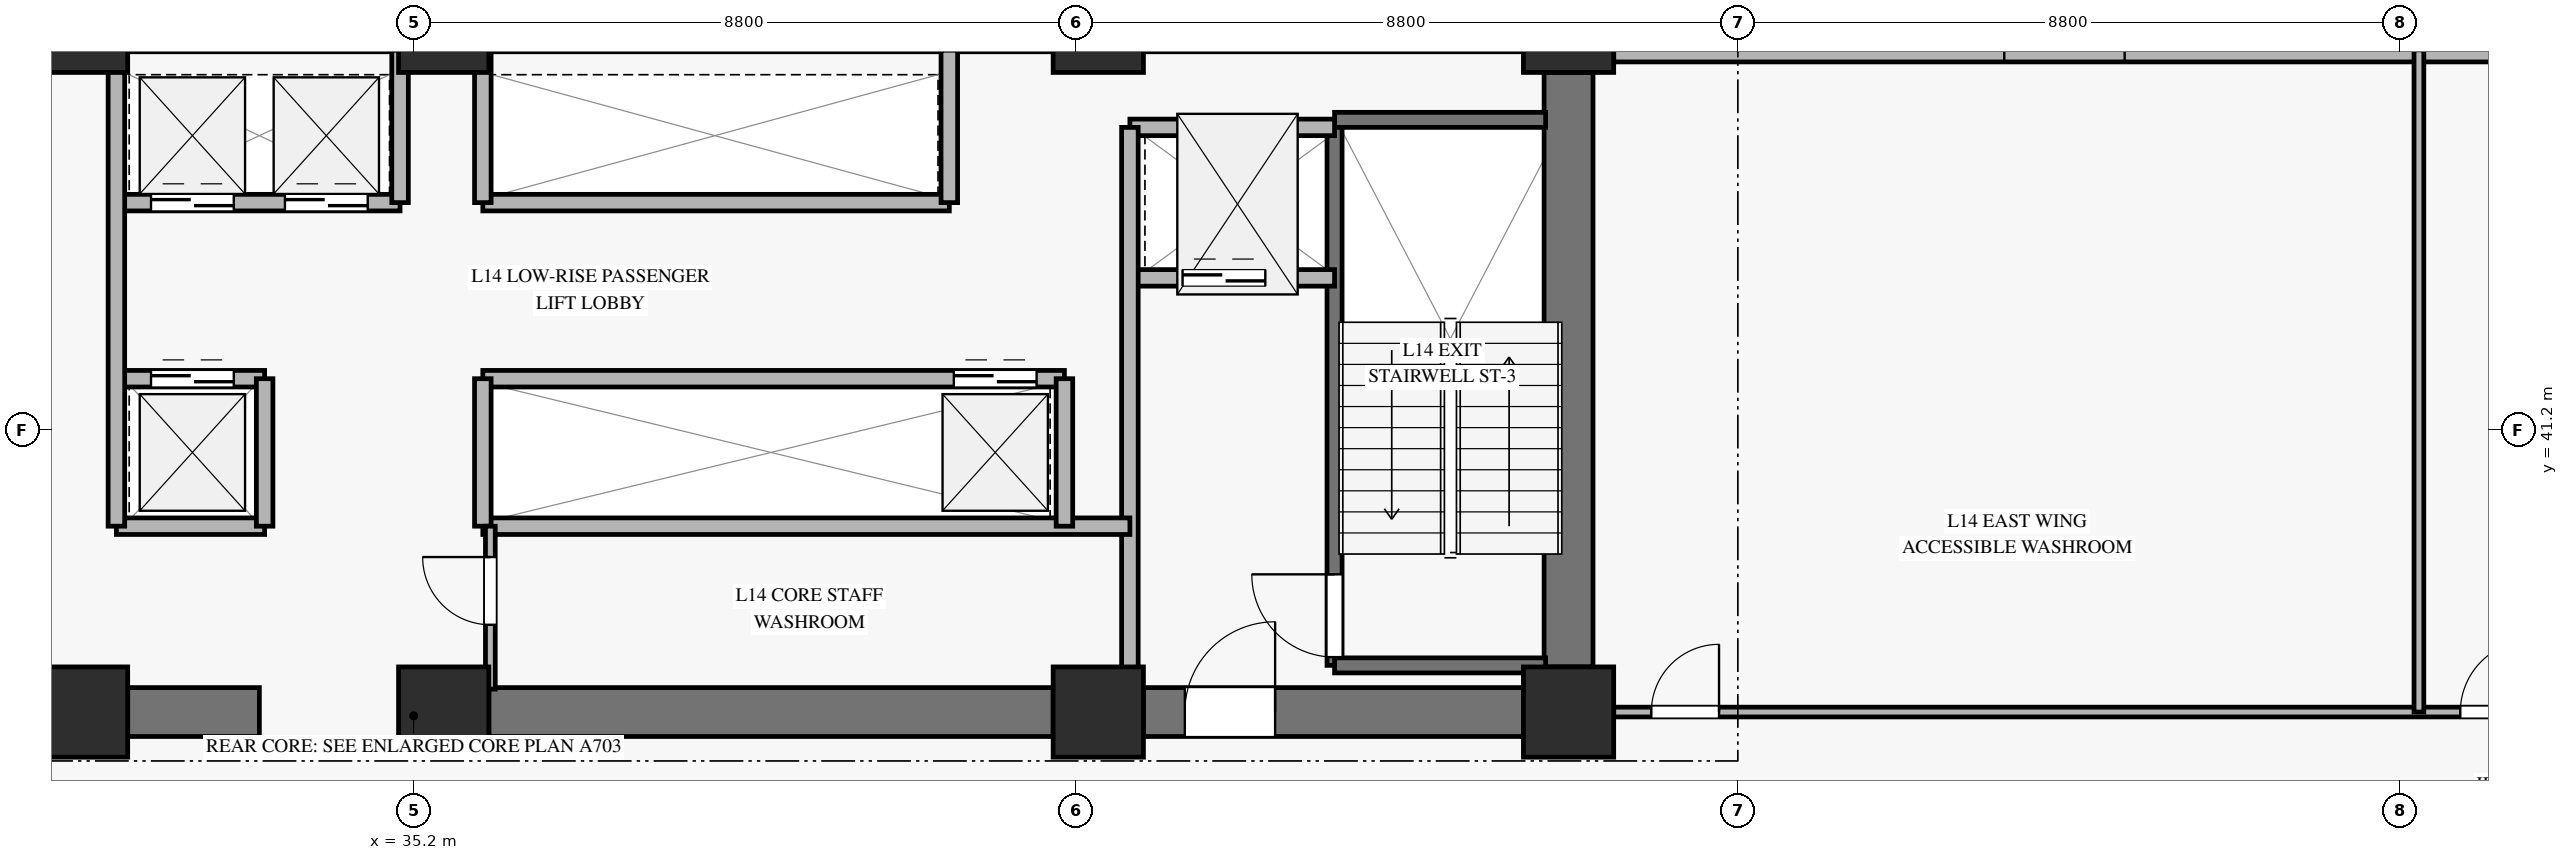
"""IFC4 building model, lengths in metres.
Left out: names, types, materials, properties, quantities, classifications, styles, units other than length and angle.
Written with IfcOpenShell. Run it as: python <this file> out.ifc"""

import sys

from ifc_helpers import new_model, si_unit, direction, frame, frame_2d, origin, origin_2d, place, context, subcontext, project, spatial, rectangle, hollow_rectangle, extrude, source, transform, mapped, element, fill, save


model = new_model("IFC4")
c1 = context("Model", 3, precision=1e-05, world=origin(), true_north=direction((0.0, 1.0)))
c2 = subcontext(c1, "Body", "Model", "MODEL_VIEW")
j1 = project(units=[si_unit("LENGTHUNIT", "METRE"), si_unit("PLANEANGLEUNIT", "RADIAN")], contexts=[c1])
p1 = place(None, origin())
s1 = spatial("IfcSite", under=j1, at=p1, CompositionType="ELEMENT")
p2 = place(p1, origin())
s2 = spatial("IfcBuilding", under=s1, at=p2, CompositionType="ELEMENT")
p3 = place(p2, frame((0.0, 0.0, 57.2)))
s3 = spatial("IfcBuildingStorey", under=s2, at=p3, CompositionType="ELEMENT", Elevation=57.2)
m1 = source(origin(), c2, "Body", "SweptSolid", [
    extrude(rectangle(XDim=1.2, YDim=1.2, at=origin_2d()), origin(), (0.0, 0.0, 1.0), 3.68),
])
for number, where, z_axis, x_axis in (
    (1, (30.8, 37.45, 0.0), (0.0, 0.0, 1.0), (1.0, 0.0, 0.0)),
    (2, (30.8, 46.55, 0.0), (0.0, 0.0, 1.0), (1.0, 0.0, 0.0)),
    (3, (35.6, 37.45, 0.0), (0.0, 0.0, 1.0), (1.0, 0.0, 0.0)),
    (4, (35.6, 46.55, 0.0), (0.0, 0.0, 1.0), (1.0, 0.0, 0.0)),
    (5, (44.3, 37.45, 0.0), (0.0, 0.0, 1.0), (1.0, 0.0, 0.0)),
    (6, (44.3, 46.55, 0.0), (0.0, 0.0, 1.0), (1.0, 0.0, 0.0)),
    (7, (50.55, 37.45, 0.0), (0.0, 0.0, 1.0), (1.0, 0.0, 0.0)),
    (8, (50.55, 46.55, 0.0), (0.0, 0.0, 1.0), (1.0, 0.0, 0.0)),
):
    element("IfcColumn", number, at=place(p3, frame(where, z_axis=z_axis, x_axis=x_axis)), inside=s3, PredefinedType="PILASTER", context=c2, shape_type="MappedRepresentation", body=[
        mapped(m1, transform((0.0, 0.0, 0.0), x_axis=(1.0, 0.0, 0.0), y_axis=(0.0, 1.0, 0.0), z_axis=(0.0, 0.0, 1.0), scale=1.0)),
    ])
p4 = place(p3, frame((31.4, 37.45, 0.0), z_axis=(0.0, 0.0, 1.0), x_axis=(1.0, 0.0, 0.0)))
e9 = element("IfcWall", 9, at=p4, inside=s3, PredefinedType="SHEAR", context=c2, shape_type="SweptSolid", body=[
    extrude(rectangle(XDim=1.75, YDim=0.65, at=frame_2d((0.875, 0.0))), origin(), (0.0, 0.0, 1.0), 3.68),
])
p5 = place(p3, frame((36.2, 37.45, 0.0), z_axis=(0.0, 0.0, 1.0), x_axis=(1.0, 0.0, 0.0)))
e10 = element("IfcWall", 10, at=p5, inside=s3, PredefinedType="SHEAR", context=c2, shape_type="SweptSolid", body=[
    extrude(rectangle(XDim=7.5, YDim=0.65, at=frame_2d((3.75, 0.0))), origin(), (0.0, 0.0, 1.0), 3.68),
])
p6 = place(p3, frame((44.9, 37.45, 0.0), z_axis=(0.0, 0.0, 1.0), x_axis=(1.0, 0.0, 0.0)))
e11 = element("IfcWall", 11, at=p6, inside=s3, PredefinedType="SHEAR", context=c2, shape_type="SweptSolid", body=[
    extrude(rectangle(XDim=5.05, YDim=0.65, at=frame_2d((2.525, 0.0))), origin(), (0.0, 0.0, 1.0), 3.68),
])
p7 = place(p6, frame((0.55, 0.0, 0.0)))
e12 = element("IfcOpeningElement", 12, at=p7, cuts=e11, PredefinedType="OPENING", context=c2, shape_type="SweptSolid", body=[
    extrude(rectangle(XDim=1.2, YDim=2.15, at=frame_2d((0.6, 1.075))), frame((0.0, 0.335, 0.0), z_axis=(0.0, -1.0, 0.0), x_axis=(1.0, 0.0, 0.0)), (0.0, 0.0, 1.0), 0.67),
])
p8 = place(p3, frame((50.55, 38.05, 0.0), z_axis=(0.0, 0.0, 1.0), x_axis=(0.0, 1.0, 0.0)))
e13 = element("IfcWall", 13, at=p8, inside=s3, PredefinedType="SHEAR", context=c2, shape_type="SweptSolid", body=[
    extrude(rectangle(XDim=7.9, YDim=0.65, at=frame_2d((3.95, 0.0))), origin(), (0.0, 0.0, 1.0), 3.68),
])
m2 = source(origin(), c2, "Body", "SweptSolid", [
    extrude(hollow_rectangle(XDim=1.6, YDim=1.6, WallThickness=0.075, at=origin_2d()), origin(), (0.0, 0.0, 1.0), 3.686),
])
p9 = place(p3, frame((63.682, 42.952, 0.0), z_axis=(-0.05636738431, 0.007087320941, 0.998384939724), x_axis=(-0.124752184173, -0.992187932069, 0.0)))
e14 = element("IfcColumn", 14, at=p9, inside=s3, PredefinedType="COLUMN", context=c2, shape_type="MappedRepresentation", body=[
    mapped(m2, transform((0.0, 0.0, 0.0), x_axis=(1.0, 0.0, 0.0), y_axis=(0.0, 1.0, 0.0), z_axis=(0.0, 0.0, 1.0), scale=1.0)),
])
p10 = place(p3, frame((51.15, 46.25, 0.0), z_axis=(0.0, 0.0, 1.0), x_axis=(1.0, 0.0, 0.0)))
e15 = element("IfcWall", 15, at=p10, inside=s3, PredefinedType="SOLIDWALL", context=c2, shape_type="SweptSolid", body=[
    extrude(rectangle(XDim=11.982, YDim=0.32, at=frame_2d((5.991, 0.0))), origin(), (0.0, 0.0, 1.0), 3.16),
])
p11 = place(p10, frame((5.191, 0.0, 0.45)))
e16 = element("IfcOpeningElement", 16, at=p11, cuts=e15, PredefinedType="OPENING", context=c2, shape_type="SweptSolid", body=[
    extrude(rectangle(XDim=1.6, YDim=2.0, at=frame_2d((0.8, 1.0))), frame((0.0, 0.17, 0.0), z_axis=(0.0, -1.0, 0.0), x_axis=(1.0, 0.0, 0.0)), (0.0, 0.0, 1.0), 0.34),
])
p12 = place(p3, frame((47.44, 38.07, 0.0), z_axis=(0.0, 0.0, 1.0), x_axis=(0.0, 1.0, 0.0)))
e17 = element("IfcWall", 17, at=p12, inside=s3, PredefinedType="SOLIDWALL", context=c2, shape_type="SweptSolid", body=[
    extrude(rectangle(XDim=7.25, YDim=0.2, at=frame_2d((3.625, 0.0))), origin(), (0.0, 0.0, 1.0), 3.9),
])
p13 = place(p12, frame((0.11, 0.0, 0.0)))
e18 = element("IfcOpeningElement", 18, at=p13, cuts=e17, PredefinedType="OPENING", context=c2, shape_type="SweptSolid", body=[
    extrude(rectangle(XDim=1.1, YDim=2.15, at=frame_2d((0.55, 1.075))), frame((0.0, 0.11, 0.0), z_axis=(0.0, -1.0, 0.0), x_axis=(1.0, 0.0, 0.0)), (0.0, 0.0, 1.0), 0.22),
])
for number, where, z_axis, x_axis in (
    (19, (47.44, 45.32, 0.0), (0.0, 0.0, 1.0), (1.0, 0.0, 0.0)),
    (20, (47.44, 38.07, 0.0), (0.0, 0.0, 1.0), (1.0, 0.0, 0.0)),
):
    element("IfcWall", number, at=place(p3, frame(where, z_axis=z_axis, x_axis=x_axis)), inside=s3, PredefinedType="SOLIDWALL", context=c2, shape_type="SweptSolid", body=[
        extrude(rectangle(XDim=2.805, YDim=0.2, at=frame_2d((1.403, 0.0))), origin(), (0.0, 0.0, 1.0), 3.9),
    ])
p14 = place(p3, frame((44.72, 43.22, 0.0), z_axis=(0.0, 0.0, 1.0), x_axis=(1.0, 0.0, 0.0)))
e21 = element("IfcWall", 21, at=p14, inside=s3, PredefinedType="SOLIDWALL", context=c2, shape_type="SweptSolid", body=[
    extrude(rectangle(XDim=2.72, YDim=0.22, at=frame_2d((1.36, 0.0))), origin(), (0.0, 0.0, 1.0), 3.68),
])
p15 = place(p14, frame((0.7, 0.0, 0.0)))
e22 = element("IfcOpeningElement", 22, at=p15, cuts=e21, PredefinedType="OPENING", context=c2, shape_type="SweptSolid", body=[
    extrude(rectangle(XDim=1.1, YDim=2.2, at=frame_2d((0.55, 1.1))), frame((0.0, 0.12, 0.0), z_axis=(0.0, -1.0, 0.0), x_axis=(1.0, 0.0, 0.0)), (0.0, 0.0, 1.0), 0.24),
])
p16 = place(p3, frame((44.72, 45.22, 0.0), z_axis=(0.0, 0.0, 1.0), x_axis=(1.0, 0.0, 0.0)))
e23 = element("IfcWall", 23, at=p16, inside=s3, PredefinedType="SOLIDWALL", context=c2, shape_type="SweptSolid", body=[
    extrude(rectangle(XDim=2.72, YDim=0.22, at=frame_2d((1.36, 0.0))), origin(), (0.0, 0.0, 1.0), 3.68),
])
p17 = place(p3, frame((44.72, 37.755, 0.0), z_axis=(0.0, 0.0, 1.0), x_axis=(0.0, 1.0, 0.0)))
e24 = element("IfcWall", 24, at=p17, inside=s3, PredefinedType="SOLIDWALL", context=c2, shape_type="SweptSolid", body=[
    extrude(rectangle(XDim=7.465, YDim=0.22, at=frame_2d((3.732, 0.0))), origin(), (0.0, 0.0, 1.0), 3.68),
])
p18 = place(p3, frame((31.25, 44.22, 0.0), z_axis=(0.0, 0.0, 1.0), x_axis=(1.0, 0.0, 0.0)))
e25 = element("IfcWall", 25, at=p18, inside=s3, PredefinedType="SOLIDWALL", context=c2, shape_type="SweptSolid", body=[
    extrude(rectangle(XDim=3.77, YDim=0.22, at=frame_2d((1.885, 0.0))), origin(), (0.0, 0.0, 1.0), 3.68),
])
p19 = place(p18, frame((0.46, 0.0, 0.0)))
e26 = element("IfcOpeningElement", 26, at=p19, cuts=e25, PredefinedType="OPENING", context=c2, shape_type="SweptSolid", body=[
    extrude(rectangle(XDim=1.1, YDim=2.2, at=frame_2d((0.55, 1.1))), frame((0.0, 0.12, 0.0), z_axis=(0.0, -1.0, 0.0), x_axis=(1.0, 0.0, 0.0)), (0.0, 0.0, 1.0), 0.24),
])
p20 = place(p18, frame((2.24, 0.0, 0.0)))
e27 = element("IfcOpeningElement", 27, at=p20, cuts=e25, PredefinedType="OPENING", context=c2, shape_type="SweptSolid", body=[
    extrude(rectangle(XDim=1.1, YDim=2.2, at=frame_2d((0.55, 1.1))), frame((0.0, 0.12, 0.0), z_axis=(0.0, -1.0, 0.0), x_axis=(1.0, 0.0, 0.0)), (0.0, 0.0, 1.0), 0.24),
])
p21 = place(p3, frame((36.12, 44.22, 0.0), z_axis=(0.0, 0.0, 1.0), x_axis=(1.0, 0.0, 0.0)))
e28 = element("IfcWall", 28, at=p21, inside=s3, PredefinedType="SOLIDWALL", context=c2, shape_type="SweptSolid", body=[
    extrude(rectangle(XDim=6.2, YDim=0.22, at=frame_2d((3.1, 0.0))), origin(), (0.0, 0.0, 1.0), 3.68),
])
for number, where, z_axis, x_axis in (
    (29, (35.02, 44.22, 0.0), (0.0, 0.0, 1.0), (0.0, 1.0, 0.0)),
    (30, (36.12, 44.22, 0.0), (0.0, 0.0, 1.0), (0.0, 1.0, 0.0)),
    (31, (42.32, 44.22, 0.0), (0.0, 0.0, 1.0), (0.0, 1.0, 0.0)),
):
    element("IfcWall", number, at=place(p3, frame(where, z_axis=z_axis, x_axis=x_axis)), inside=s3, PredefinedType="SOLIDWALL", context=c2, shape_type="SweptSolid", body=[
        extrude(rectangle(XDim=2.025, YDim=0.22, at=frame_2d((1.013, 0.0))), origin(), (0.0, 0.0, 1.0), 3.68),
    ])
p22 = place(p3, frame((31.25, 41.88, 0.0), z_axis=(0.0, 0.0, 1.0), x_axis=(1.0, 0.0, 0.0)))
e32 = element("IfcWall", 32, at=p22, inside=s3, PredefinedType="SOLIDWALL", context=c2, shape_type="SweptSolid", body=[
    extrude(rectangle(XDim=1.97, YDim=0.22, at=frame_2d((0.985, 0.0))), origin(), (0.0, 0.0, 1.0), 3.68),
])
p23 = place(p22, frame((0.46, 0.0, 0.0)))
e33 = element("IfcOpeningElement", 33, at=p23, cuts=e32, PredefinedType="OPENING", context=c2, shape_type="SweptSolid", body=[
    extrude(rectangle(XDim=1.1, YDim=2.2, at=frame_2d((0.55, 1.1))), frame((0.0, 0.12, 0.0), z_axis=(0.0, -1.0, 0.0), x_axis=(1.0, 0.0, 0.0)), (0.0, 0.0, 1.0), 0.24),
])
p24 = place(p3, frame((36.12, 41.88, 0.0), z_axis=(0.0, 0.0, 1.0), x_axis=(1.0, 0.0, 0.0)))
e34 = element("IfcWall", 34, at=p24, inside=s3, PredefinedType="SOLIDWALL", context=c2, shape_type="SweptSolid", body=[
    extrude(rectangle(XDim=7.73, YDim=0.22, at=frame_2d((3.865, 0.0))), origin(), (0.0, 0.0, 1.0), 3.68),
])
p25 = place(p24, frame((6.26, 0.0, 0.0)))
e35 = element("IfcOpeningElement", 35, at=p25, cuts=e34, PredefinedType="OPENING", context=c2, shape_type="SweptSolid", body=[
    extrude(rectangle(XDim=1.1, YDim=2.2, at=frame_2d((0.55, 1.1))), frame((0.0, 0.12, 0.0), z_axis=(0.0, -1.0, 0.0), x_axis=(1.0, 0.0, 0.0)), (0.0, 0.0, 1.0), 0.24),
])
p26 = place(p3, frame((31.25, 39.92, 0.0), z_axis=(0.0, 0.0, 1.0), x_axis=(1.0, 0.0, 0.0)))
e36 = element("IfcWall", 36, at=p26, inside=s3, PredefinedType="SOLIDWALL", context=c2, shape_type="SweptSolid", body=[
    extrude(rectangle(XDim=1.97, YDim=0.22, at=frame_2d((0.985, 0.0))), origin(), (0.0, 0.0, 1.0), 3.68),
])
p27 = place(p3, frame((33.22, 39.92, 0.0), z_axis=(0.0, 0.0, 1.0), x_axis=(0.0, 1.0, 0.0)))
e37 = element("IfcWall", 37, at=p27, inside=s3, PredefinedType="SOLIDWALL", context=c2, shape_type="SweptSolid", body=[
    extrude(rectangle(XDim=1.96, YDim=0.22, at=frame_2d((0.98, 0.0))), origin(), (0.0, 0.0, 1.0), 3.68),
])
p28 = place(p3, frame((36.12, 39.92, 0.0), z_axis=(0.0, 0.0, 1.0), x_axis=(1.0, 0.0, 0.0)))
e38 = element("IfcWall", 38, at=p28, inside=s3, PredefinedType="SOLIDWALL", context=c2, shape_type="SweptSolid", body=[
    extrude(rectangle(XDim=8.6, YDim=0.22, at=frame_2d((4.3, 0.0))), origin(), (0.0, 0.0, 1.0), 2.965),
])
p29 = place(p3, frame((36.12, 39.92, 0.0), z_axis=(0.0, 0.0, 1.0), x_axis=(0.0, 1.0, 0.0)))
e39 = element("IfcWall", 39, at=p29, inside=s3, PredefinedType="SOLIDWALL", context=c2, shape_type="SweptSolid", body=[
    extrude(rectangle(XDim=1.96, YDim=0.22, at=frame_2d((0.98, 0.0))), origin(), (0.0, 0.0, 1.0), 3.68),
])
p30 = place(p3, frame((31.25, 39.92, 0.0), z_axis=(0.0, 0.0, 1.0), x_axis=(0.0, 1.0, 0.0)))
e40 = element("IfcWall", 40, at=p30, inside=s3, PredefinedType="SOLIDWALL", context=c2, shape_type="SweptSolid", body=[
    extrude(rectangle(XDim=6.325, YDim=0.22, at=frame_2d((3.163, 0.0))), origin(), (0.0, 0.0, 1.0), 3.68),
])
p31 = place(p3, frame((43.85, 39.92, 0.0), z_axis=(0.0, 0.0, 1.0), x_axis=(0.0, 1.0, 0.0)))
e41 = element("IfcWall", 41, at=p31, inside=s3, PredefinedType="SOLIDWALL", context=c2, shape_type="SweptSolid", body=[
    extrude(rectangle(XDim=1.96, YDim=0.22, at=frame_2d((0.98, 0.0))), origin(), (0.0, 0.0, 1.0), 3.68),
])
p32 = place(p3, frame((36.22, 37.755, 0.0), z_axis=(0.0, 0.0, 1.0), x_axis=(0.0, 1.0, 0.0)))
e42 = element("IfcWall", 42, at=p32, inside=s3, PredefinedType="PARTITIONING", context=c2, shape_type="SweptSolid", body=[
    extrude(rectangle(XDim=2.165, YDim=0.13, at=frame_2d((1.083, 0.0))), origin(), (0.0, 0.0, 1.0), 3.68),
])
p33 = place(p32, frame((0.855, 0.0, 0.0)))
e43 = element("IfcOpeningElement", 43, at=p33, cuts=e42, PredefinedType="OPENING", context=c2, shape_type="SweptSolid", body=[
    extrude(rectangle(XDim=0.9, YDim=2.1, at=frame_2d((0.45, 1.05))), frame((0.0, 0.075, 0.0), z_axis=(0.0, -1.0, 0.0), x_axis=(1.0, 0.0, 0.0)), (0.0, 0.0, 1.0), 0.15),
])
p34 = place(p3, frame((51.15, 37.45, 0.0), z_axis=(0.0, 0.0, 1.0), x_axis=(1.0, 0.0, 0.0)))
e44 = element("IfcWall", 44, at=p34, inside=s3, PredefinedType="PARTITIONING", context=c2, shape_type="SweptSolid", body=[
    extrude(rectangle(XDim=15.68, YDim=0.13, at=frame_2d((7.84, 0.0))), origin(), (0.0, 0.0, 1.0), 3.165),
])
p35 = place(p34, frame((0.5, 0.0, 0.0)))
e45 = element("IfcOpeningElement", 45, at=p35, cuts=e44, PredefinedType="OPENING", context=c2, shape_type="SweptSolid", body=[
    extrude(rectangle(XDim=0.9, YDim=2.1, at=frame_2d((0.45, 1.05))), frame((0.0, 0.075, 0.0), z_axis=(0.0, -1.0, 0.0), x_axis=(1.0, 0.0, 0.0)), (0.0, 0.0, 1.0), 0.15),
])
p36 = place(p34, frame((11.252, 0.0, 0.0)))
e46 = element("IfcOpeningElement", 46, at=p36, cuts=e44, PredefinedType="OPENING", context=c2, shape_type="SweptSolid", body=[
    extrude(rectangle(XDim=0.95, YDim=2.1, at=frame_2d((0.475, 1.05))), frame((0.0, 0.075, 0.0), z_axis=(0.0, -1.0, 0.0), x_axis=(1.0, 0.0, 0.0)), (0.0, 0.0, 1.0), 0.15),
])
p37 = place(p3, frame((61.852, 37.45, 0.0), z_axis=(0.0, 0.0, 1.0), x_axis=(0.0, 1.0, 0.0)))
e47 = element("IfcWall", 47, at=p37, inside=s3, PredefinedType="PARTITIONING", context=c2, shape_type="SweptSolid", body=[
    extrude(rectangle(XDim=8.8, YDim=0.13, at=frame_2d((4.4, 0.0))), origin(), (0.0, 0.0, 1.0), 3.68),
])
m3 = source(origin(), c2, "Body", "SweptSolid", [
    extrude(rectangle(XDim=1.1, YDim=2.15, at=frame_2d((0.55, 1.075))), frame((0.0, 0.025, 0.0), z_axis=(0.0, -1.0, 0.0), x_axis=(1.0, 0.0, 0.0)), (0.0, 0.0, 1.0), 0.05),
])
p38 = place(p13, origin())
e48 = element("IfcDoor", 48, at=p38, inside=s3, OperationType="SINGLE_SWING_RIGHT", PredefinedType="DOOR", context=c2, shape_type="MappedRepresentation", body=[
    mapped(m3, transform((0.0, 0.0, 0.0), x_axis=(1.0, 0.0, 0.0), y_axis=(0.0, 1.0, 0.0), z_axis=(0.0, 0.0, 1.0), scale=1.0)),
])
fill(e18, e48)
m4 = source(origin(), c2, "Body", "SweptSolid", [
    extrude(rectangle(XDim=1.1, YDim=2.2, at=frame_2d((0.55, 1.1))), frame((0.0, 0.025, 0.0), z_axis=(0.0, -1.0, 0.0), x_axis=(1.0, 0.0, 0.0)), (0.0, 0.0, 1.0), 0.05),
])
p39 = place(p15, origin())
e49 = element("IfcDoor", 49, at=p39, inside=s3, OperationType="SLIDING_TO_LEFT", PredefinedType="DOOR", context=c2, shape_type="MappedRepresentation", body=[
    mapped(m4, transform((0.0, 0.0, 0.0), x_axis=(1.0, 0.0, 0.0), y_axis=(0.0, 1.0, 0.0), z_axis=(0.0, 0.0, 1.0), scale=1.0)),
])
fill(e22, e49)
m5 = source(origin(), c2, "Body", "SweptSolid", [
    extrude(rectangle(XDim=1.2, YDim=2.15, at=frame_2d((0.6, 1.075))), frame((0.0, 0.025, 0.0), z_axis=(0.0, -1.0, 0.0), x_axis=(1.0, 0.0, 0.0)), (0.0, 0.0, 1.0), 0.05),
])
p40 = place(p7, origin())
e50 = element("IfcDoor", 50, at=p40, inside=s3, OperationType="SINGLE_SWING_RIGHT", PredefinedType="DOOR", context=c2, shape_type="MappedRepresentation", body=[
    mapped(m5, transform((0.0, 0.0, 0.0), x_axis=(1.0, 0.0, 0.0), y_axis=(0.0, 1.0, 0.0), z_axis=(0.0, 0.0, 1.0), scale=1.0)),
])
fill(e12, e50)
p41 = place(p19, origin())
e51 = element("IfcDoor", 51, at=p41, inside=s3, OperationType="SLIDING_TO_LEFT", PredefinedType="DOOR", context=c2, shape_type="MappedRepresentation", body=[
    mapped(m4, transform((0.0, 0.0, 0.0), x_axis=(1.0, 0.0, 0.0), y_axis=(0.0, 1.0, 0.0), z_axis=(0.0, 0.0, 1.0), scale=1.0)),
])
fill(e26, e51)
p42 = place(p20, origin())
e52 = element("IfcDoor", 52, at=p42, inside=s3, OperationType="SLIDING_TO_LEFT", PredefinedType="DOOR", context=c2, shape_type="MappedRepresentation", body=[
    mapped(m4, transform((0.0, 0.0, 0.0), x_axis=(1.0, 0.0, 0.0), y_axis=(0.0, 1.0, 0.0), z_axis=(0.0, 0.0, 1.0), scale=1.0)),
])
fill(e27, e52)
p43 = place(p23, origin())
e53 = element("IfcDoor", 53, at=p43, inside=s3, OperationType="SLIDING_TO_LEFT", PredefinedType="DOOR", context=c2, shape_type="MappedRepresentation", body=[
    mapped(m4, transform((0.0, 0.0, 0.0), x_axis=(1.0, 0.0, 0.0), y_axis=(0.0, 1.0, 0.0), z_axis=(0.0, 0.0, 1.0), scale=1.0)),
])
fill(e33, e53)
p44 = place(p25, origin())
e54 = element("IfcDoor", 54, at=p44, inside=s3, OperationType="SLIDING_TO_LEFT", PredefinedType="DOOR", context=c2, shape_type="MappedRepresentation", body=[
    mapped(m4, transform((0.0, 0.0, 0.0), x_axis=(1.0, 0.0, 0.0), y_axis=(0.0, 1.0, 0.0), z_axis=(0.0, 0.0, 1.0), scale=1.0)),
])
fill(e35, e54)
m6 = source(origin(), c2, "Body", "SweptSolid", [
    extrude(rectangle(XDim=0.9, YDim=2.1, at=frame_2d((0.45, 1.05))), frame((0.0, 0.025, 0.0), z_axis=(0.0, -1.0, 0.0), x_axis=(1.0, 0.0, 0.0)), (0.0, 0.0, 1.0), 0.05),
])
p45 = place(p33, origin())
e55 = element("IfcDoor", 55, at=p45, inside=s3, OperationType="SINGLE_SWING_RIGHT", PredefinedType="DOOR", context=c2, shape_type="MappedRepresentation", body=[
    mapped(m6, transform((0.0, 0.0, 0.0), x_axis=(1.0, 0.0, 0.0), y_axis=(0.0, 1.0, 0.0), z_axis=(0.0, 0.0, 1.0), scale=1.0)),
])
fill(e43, e55)
p46 = place(p35, origin())
e56 = element("IfcDoor", 56, at=p46, inside=s3, OperationType="SINGLE_SWING_RIGHT", PredefinedType="DOOR", context=c2, shape_type="MappedRepresentation", body=[
    mapped(m6, transform((0.0, 0.0, 0.0), x_axis=(1.0, 0.0, 0.0), y_axis=(0.0, 1.0, 0.0), z_axis=(0.0, 0.0, 1.0), scale=1.0)),
])
fill(e45, e56)
m7 = source(origin(), c2, "Body", "SweptSolid", [
    extrude(rectangle(XDim=0.95, YDim=2.1, at=frame_2d((0.475, 1.05))), frame((0.0, 0.025, 0.0), z_axis=(0.0, -1.0, 0.0), x_axis=(1.0, 0.0, 0.0)), (0.0, 0.0, 1.0), 0.05),
])
p47 = place(p36, origin())
e57 = element("IfcDoor", 57, at=p47, inside=s3, OperationType="SINGLE_SWING_RIGHT", PredefinedType="DOOR", context=c2, shape_type="MappedRepresentation", body=[
    mapped(m7, transform((0.0, 0.0, 0.0), x_axis=(1.0, 0.0, 0.0), y_axis=(0.0, 1.0, 0.0), z_axis=(0.0, 0.0, 1.0), scale=1.0)),
])
fill(e46, e57)
save(model, sys.argv[1])
